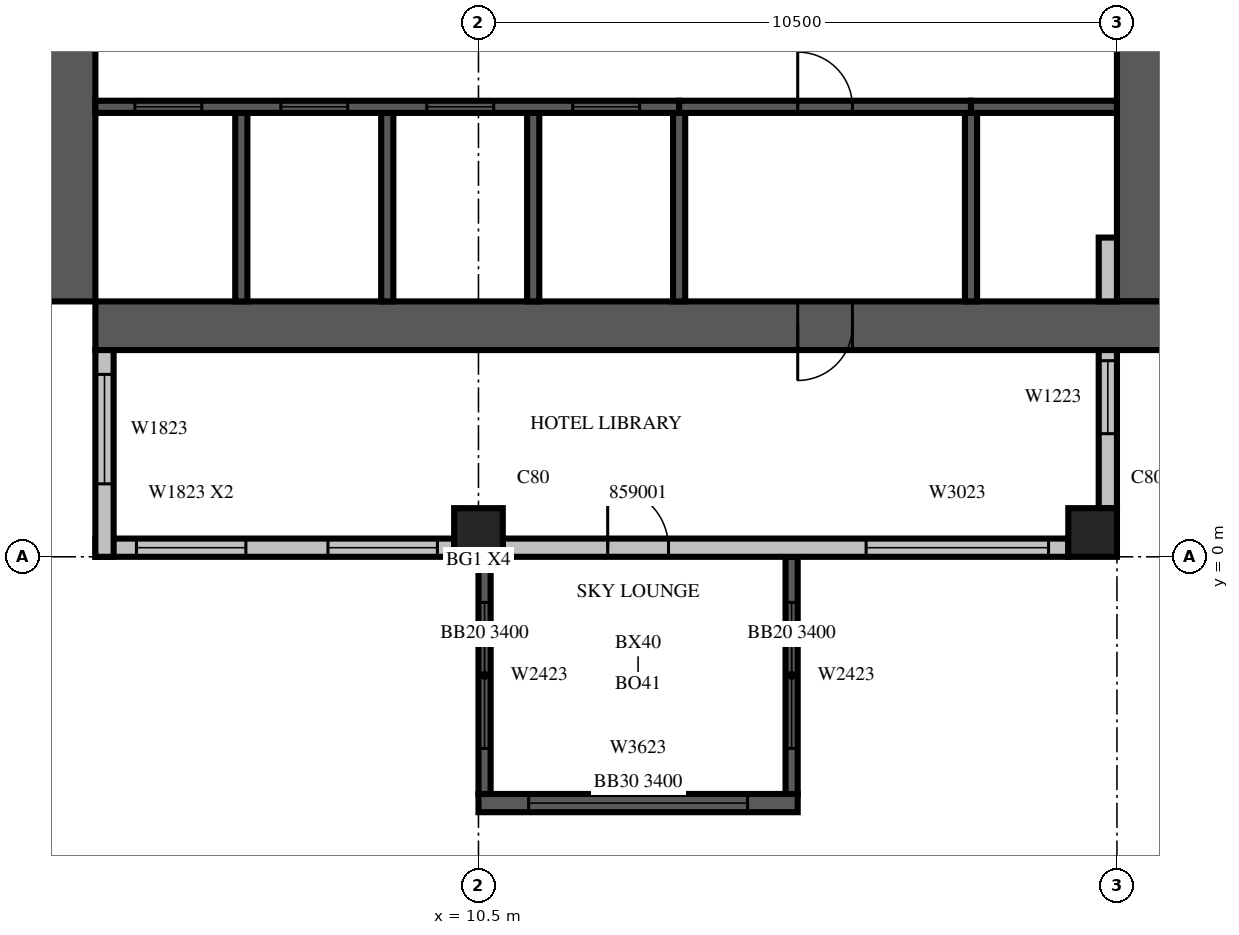
"""IFC4 building model, lengths in metres.
Left out: names, types, materials, properties, quantities, classifications, styles, units other than length and angle.
Written with IfcOpenShell. Run it as: python <this file> out.ifc"""

import sys

from ifc_helpers import new_model, si_unit, direction, frame, frame_2d, origin, origin_2d, place, context, subcontext, project, spatial, rectangle, extrude, source, transform, mapped, element, fill, save


model = new_model("IFC4")
c1 = context("Model", 3, precision=1e-05, world=origin(), true_north=direction((0.0, 1.0)))
c2 = subcontext(c1, "Body", "Model", "MODEL_VIEW")
j1 = project(units=[si_unit("LENGTHUNIT", "METRE"), si_unit("PLANEANGLEUNIT", "RADIAN")], contexts=[c1])
p1 = place(None, origin())
s1 = spatial("IfcSite", under=j1, at=p1, CompositionType="ELEMENT")
p2 = place(p1, origin())
s2 = spatial("IfcBuilding", under=s1, at=p2, CompositionType="ELEMENT")
p3 = place(p2, frame((0.0, 0.0, 257.6)))
s3 = spatial("IfcBuildingStorey", under=s2, at=p3, CompositionType="ELEMENT", Elevation=257.6)
m1 = source(origin(), c2, "Body", "SweptSolid", [
    extrude(rectangle(XDim=0.8, YDim=0.8, at=origin_2d()), origin(), (0.0, 0.0, 1.0), 3.8),
])
for number, where, z_axis, x_axis in (
    (1, (10.5, 0.4, 0.0), (0.0, 0.0, 1.0), (1.0, 0.0, 0.0)),
    (2, (20.6, 0.4, 0.0), (0.0, 0.0, 1.0), (1.0, 0.0, 0.0)),
):
    element("IfcColumn", number, at=place(p3, frame(where, z_axis=z_axis, x_axis=x_axis)), inside=s3, PredefinedType="COLUMN", context=c2, shape_type="MappedRepresentation", body=[
        mapped(m1, transform((0.0, 0.0, 0.0), scale=1.0)),
    ])
m2 = source(origin(), c2, "Body", "SweptSolid", [
    extrude(rectangle(XDim=17.6, YDim=0.8, at=frame_2d((8.8, 0.0))), origin(), (0.0, 0.0, 1.0), 3.8),
])
p4 = place(p3, frame((3.8, 4.2, 0.0), z_axis=(0.0, 0.0, 1.0), x_axis=(0.0, 1.0, 0.0)))
e3 = element("IfcWall", 3, at=p4, inside=s3, PredefinedType="SHEAR", context=c2, shape_type="MappedRepresentation", body=[
    mapped(m2, transform((0.0, 0.0, 0.0), scale=1.0)),
])
m3 = source(origin(), c2, "Body", "SweptSolid", [
    extrude(rectangle(XDim=2.2, YDim=2.1, at=frame_2d((1.1, 1.05))), frame((0.0, 0.41, 0.0), z_axis=(0.0, -1.0, 0.0), x_axis=(1.0, 0.0, 0.0)), (0.0, 0.0, 1.0), 0.82),
])
p5 = place(p4, frame((4.2, 0.0, 0.0)))
e4 = element("IfcOpeningElement", 4, at=p5, cuts=e3, PredefinedType="OPENING", context=c2, shape_type="MappedRepresentation", body=[
    mapped(m3, transform((0.0, 0.0, 0.0), scale=1.0)),
])
m4 = source(origin(), c2, "Body", "SweptSolid", [
    extrude(rectangle(XDim=0.9, YDim=2.1, at=frame_2d((0.45, 1.05))), frame((0.0, 0.41, 0.0), z_axis=(0.0, -1.0, 0.0), x_axis=(1.0, 0.0, 0.0)), (0.0, 0.0, 1.0), 0.82),
])
p6 = place(p4, frame((10.95, 0.0, 0.0)))
e5 = element("IfcOpeningElement", 5, at=p6, cuts=e3, PredefinedType="OPENING", context=c2, shape_type="MappedRepresentation", body=[
    mapped(m4, transform((0.0, 0.0, 0.0), scale=1.0)),
])
m5 = source(origin(), c2, "Body", "SweptSolid", [
    extrude(rectangle(XDim=16.8, YDim=0.8, at=frame_2d((8.4, 0.0))), origin(), (0.0, 0.0, 1.0), 3.8),
])
p7 = place(p3, frame((21.4, 4.2, 0.0), z_axis=(0.0, 0.0, 1.0), x_axis=(0.0, 1.0, 0.0)))
e6 = element("IfcWall", 6, at=p7, inside=s3, PredefinedType="SHEAR", context=c2, shape_type="MappedRepresentation", body=[
    mapped(m5, transform((0.0, 0.0, 0.0), scale=1.0)),
])
m6 = source(origin(), c2, "Body", "SweptSolid", [
    extrude(rectangle(XDim=1.2, YDim=2.1, at=frame_2d((0.6, 1.05))), frame((0.0, 0.41, 0.0), z_axis=(0.0, -1.0, 0.0), x_axis=(1.0, 0.0, 0.0)), (0.0, 0.0, 1.0), 0.82),
])
p8 = place(p7, frame((14.7, 0.0, 0.0)))
e7 = element("IfcOpeningElement", 7, at=p8, cuts=e6, PredefinedType="OPENING", context=c2, shape_type="MappedRepresentation", body=[
    mapped(m6, transform((0.0, 0.0, 0.0), scale=1.0)),
])
p9 = place(p3, frame((4.2, 3.8, 0.0), z_axis=(0.0, 0.0, 1.0), x_axis=(1.0, 0.0, 0.0)))
e8 = element("IfcWall", 8, at=p9, inside=s3, PredefinedType="SHEAR", context=c2, shape_type="MappedRepresentation", body=[
    mapped(m2, transform((0.0, 0.0, 0.0), scale=1.0)),
])
p10 = place(p9, frame((11.55, 0.0, 0.0)))
e9 = element("IfcOpeningElement", 9, at=p10, cuts=e8, PredefinedType="OPENING", context=c2, shape_type="MappedRepresentation", body=[
    mapped(m4, transform((0.0, 0.0, 0.0), scale=1.0)),
])
m7 = source(origin(), c2, "Body", "SweptSolid", [
    extrude(rectangle(XDim=5.25, YDim=0.3, at=frame_2d((2.625, 0.0))), origin(), (0.0, 0.0, 1.0), 3.4),
])
p11 = place(p3, frame((10.5, -4.05, 0.0), z_axis=(0.0, 0.0, 1.0), x_axis=(1.0, 0.0, 0.0)))
e10 = element("IfcWall", 10, at=p11, inside=s3, PredefinedType="SOLIDWALL", context=c2, shape_type="MappedRepresentation", body=[
    mapped(m7, transform((0.0, 0.0, 0.0), scale=1.0)),
])
m8 = source(origin(), c2, "Body", "SweptSolid", [
    extrude(rectangle(XDim=3.6, YDim=2.3, at=frame_2d((1.8, 1.15))), frame((0.0, 0.16, 0.0), z_axis=(0.0, -1.0, 0.0), x_axis=(1.0, 0.0, 0.0)), (0.0, 0.0, 1.0), 0.32),
])
p12 = place(p11, frame((0.825, 0.0, 0.6)))
e11 = element("IfcOpeningElement", 11, at=p12, cuts=e10, PredefinedType="OPENING", context=c2, shape_type="MappedRepresentation", body=[
    mapped(m8, transform((0.0, 0.0, 0.0), scale=1.0)),
])
m9 = source(origin(), c2, "Body", "SweptSolid", [
    extrude(rectangle(XDim=3.9, YDim=0.2, at=frame_2d((1.95, 0.0))), origin(), (0.0, 0.0, 1.0), 3.4),
])
p13 = place(p3, frame((10.6, 0.0, 0.0), z_axis=(0.0, 0.0, 1.0), x_axis=(0.0, -1.0, 0.0)))
e12 = element("IfcWall", 12, at=p13, inside=s3, PredefinedType="SOLIDWALL", context=c2, shape_type="MappedRepresentation", body=[
    mapped(m9, transform((0.0, 0.0, 0.0), scale=1.0)),
])
m10 = source(origin(), c2, "Body", "SweptSolid", [
    extrude(rectangle(XDim=2.4, YDim=2.3, at=frame_2d((1.2, 1.15))), frame((0.0, 0.11, 0.0), z_axis=(0.0, -1.0, 0.0), x_axis=(1.0, 0.0, 0.0)), (0.0, 0.0, 1.0), 0.22),
])
p14 = place(p13, frame((0.75, 0.0, 0.6)))
e13 = element("IfcOpeningElement", 13, at=p14, cuts=e12, PredefinedType="OPENING", context=c2, shape_type="MappedRepresentation", body=[
    mapped(m10, transform((0.0, 0.0, 0.0), scale=1.0)),
])
p15 = place(p3, frame((15.65, 0.0, 0.0), z_axis=(0.0, 0.0, 1.0), x_axis=(0.0, -1.0, 0.0)))
e14 = element("IfcWall", 14, at=p15, inside=s3, PredefinedType="SOLIDWALL", context=c2, shape_type="MappedRepresentation", body=[
    mapped(m9, transform((0.0, 0.0, 0.0), scale=1.0)),
])
p16 = place(p15, frame((0.75, 0.0, 0.6)))
e15 = element("IfcOpeningElement", 15, at=p16, cuts=e14, PredefinedType="OPENING", context=c2, shape_type="MappedRepresentation", body=[
    mapped(m10, transform((0.0, 0.0, 0.0), scale=1.0)),
])
m11 = source(origin(), c2, "Body", "SweptSolid", [
    extrude(rectangle(XDim=5.9, YDim=0.3, at=frame_2d((2.95, 0.0))), origin(), (0.0, 0.0, 1.0), 3.4),
])
p17 = place(p3, frame((4.2, 0.15, 0.0), z_axis=(0.0, 0.0, 1.0), x_axis=(1.0, 0.0, 0.0)))
e16 = element("IfcWall", 16, at=p17, inside=s3, PredefinedType="STANDARD", context=c2, shape_type="MappedRepresentation", body=[
    mapped(m11, transform((0.0, 0.0, 0.0), scale=1.0)),
])
m12 = source(origin(), c2, "Body", "SweptSolid", [
    extrude(rectangle(XDim=1.8, YDim=2.3, at=frame_2d((0.9, 1.15))), frame((0.0, 0.16, 0.0), z_axis=(0.0, -1.0, 0.0), x_axis=(1.0, 0.0, 0.0)), (0.0, 0.0, 1.0), 0.32),
])
p18 = place(p17, frame((0.675, 0.0, 0.6)))
e17 = element("IfcOpeningElement", 17, at=p18, cuts=e16, PredefinedType="OPENING", context=c2, shape_type="MappedRepresentation", body=[
    mapped(m12, transform((0.0, 0.0, 0.0), scale=1.0)),
])
p19 = place(p17, frame((3.825, 0.0, 0.6)))
e18 = element("IfcOpeningElement", 18, at=p19, cuts=e16, PredefinedType="OPENING", context=c2, shape_type="MappedRepresentation", body=[
    mapped(m12, transform((0.0, 0.0, 0.0), scale=1.0)),
])
m13 = source(origin(), c2, "Body", "SweptSolid", [
    extrude(rectangle(XDim=9.3, YDim=0.3, at=frame_2d((4.65, 0.0))), origin(), (0.0, 0.0, 1.0), 3.4),
])
p20 = place(p3, frame((10.9, 0.15, 0.0), z_axis=(0.0, 0.0, 1.0), x_axis=(1.0, 0.0, 0.0)))
e19 = element("IfcWall", 19, at=p20, inside=s3, PredefinedType="STANDARD", context=c2, shape_type="MappedRepresentation", body=[
    mapped(m13, transform((0.0, 0.0, 0.0), scale=1.0)),
])
m14 = source(origin(), c2, "Body", "SweptSolid", [
    extrude(rectangle(XDim=3.0, YDim=2.3, at=frame_2d((1.5, 1.15))), frame((0.0, 0.16, 0.0), z_axis=(0.0, -1.0, 0.0), x_axis=(1.0, 0.0, 0.0)), (0.0, 0.0, 1.0), 0.32),
])
p21 = place(p20, frame((5.975, 0.0, 0.6)))
e20 = element("IfcOpeningElement", 20, at=p21, cuts=e19, PredefinedType="OPENING", context=c2, shape_type="MappedRepresentation", body=[
    mapped(m14, transform((0.0, 0.0, 0.0), scale=1.0)),
])
m15 = source(origin(), c2, "Body", "SweptSolid", [
    extrude(rectangle(XDim=1.0, YDim=2.1, at=frame_2d((0.5, 1.05))), frame((0.0, 0.16, 0.0), z_axis=(0.0, -1.0, 0.0), x_axis=(1.0, 0.0, 0.0)), (0.0, 0.0, 1.0), 0.32),
])
p22 = place(p20, frame((1.725, 0.0, 0.0)))
e21 = element("IfcOpeningElement", 21, at=p22, cuts=e19, PredefinedType="OPENING", context=c2, shape_type="MappedRepresentation", body=[
    mapped(m15, transform((0.0, 0.0, 0.0), scale=1.0)),
])
m16 = source(origin(), c2, "Body", "SweptSolid", [
    extrude(rectangle(XDim=2.6, YDim=0.3, at=frame_2d((1.3, 0.0))), origin(), (0.0, 0.0, 1.0), 3.4),
])
p23 = place(p3, frame((20.85, 0.8, 0.0), z_axis=(0.0, 0.0, 1.0), x_axis=(0.0, 1.0, 0.0)))
e22 = element("IfcWall", 22, at=p23, inside=s3, PredefinedType="STANDARD", context=c2, shape_type="MappedRepresentation", body=[
    mapped(m16, transform((0.0, 0.0, 0.0), scale=1.0)),
])
m17 = source(origin(), c2, "Body", "SweptSolid", [
    extrude(rectangle(XDim=1.2, YDim=2.3, at=frame_2d((0.6, 1.15))), frame((0.0, 0.16, 0.0), z_axis=(0.0, -1.0, 0.0), x_axis=(1.0, 0.0, 0.0)), (0.0, 0.0, 1.0), 0.32),
])
p24 = place(p23, frame((1.225, 0.0, 0.6)))
e23 = element("IfcOpeningElement", 23, at=p24, cuts=e22, PredefinedType="OPENING", context=c2, shape_type="MappedRepresentation", body=[
    mapped(m17, transform((0.0, 0.0, 0.0), scale=1.0)),
])
m18 = source(origin(), c2, "Body", "SweptSolid", [
    extrude(rectangle(XDim=1.05, YDim=0.3, at=frame_2d((0.525, 0.0))), origin(), (0.0, 0.0, 1.0), 3.4),
])
p25 = place(p3, frame((20.85, 4.2, 0.0), z_axis=(0.0, 0.0, 1.0), x_axis=(0.0, 1.0, 0.0)))
e24 = element("IfcWall", 24, at=p25, inside=s3, PredefinedType="STANDARD", context=c2, shape_type="MappedRepresentation", body=[
    mapped(m18, transform((0.0, 0.0, 0.0), scale=1.0)),
])
m19 = source(origin(), c2, "Body", "SweptSolid", [
    extrude(rectangle(XDim=3.4, YDim=0.3, at=frame_2d((1.7, 0.0))), origin(), (0.0, 0.0, 1.0), 3.4),
])
p26 = place(p3, frame((4.35, 3.4, 0.0), z_axis=(0.0, 0.0, 1.0), x_axis=(0.0, -1.0, 0.0)))
e25 = element("IfcWall", 25, at=p26, inside=s3, PredefinedType="STANDARD", context=c2, shape_type="MappedRepresentation", body=[
    mapped(m19, transform((0.0, 0.0, 0.0), scale=1.0)),
])
p27 = place(p26, frame((0.4, 0.0, 0.6)))
e26 = element("IfcOpeningElement", 26, at=p27, cuts=e25, PredefinedType="OPENING", context=c2, shape_type="MappedRepresentation", body=[
    mapped(m12, transform((0.0, 0.0, 0.0), scale=1.0)),
])
m20 = source(origin(), c2, "Body", "SweptSolid", [
    extrude(rectangle(XDim=3.1, YDim=0.2, at=frame_2d((1.55, 0.0))), origin(), (0.0, 0.0, 1.0), 3.8),
])
for number, where, z_axis, x_axis in (
    (27, (6.6, 4.2, 0.0), (0.0, 0.0, 1.0), (0.0, 1.0, 0.0)),
    (28, (9.0, 4.2, 0.0), (0.0, 0.0, 1.0), (0.0, 1.0, 0.0)),
    (29, (11.4, 4.2, 0.0), (0.0, 0.0, 1.0), (0.0, 1.0, 0.0)),
):
    element("IfcWall", number, at=place(p3, frame(where, z_axis=z_axis, x_axis=x_axis)), inside=s3, PredefinedType="SOLIDWALL", context=c2, shape_type="MappedRepresentation", body=[
        mapped(m20, transform((0.0, 0.0, 0.0), scale=1.0)),
    ])
m21 = source(origin(), c2, "Body", "SweptSolid", [
    extrude(rectangle(XDim=3.1, YDim=0.2, at=frame_2d((1.55, 0.0))), origin(), (0.0, 0.0, 1.0), 3.4),
])
for number, where, z_axis, x_axis in (
    (30, (13.8, 4.2, 0.0), (0.0, 0.0, 1.0), (0.0, 1.0, 0.0)),
    (31, (18.6, 4.2, 0.0), (0.0, 0.0, 1.0), (0.0, 1.0, 0.0)),
):
    element("IfcWall", number, at=place(p3, frame(where, z_axis=z_axis, x_axis=x_axis)), inside=s3, PredefinedType="SOLIDWALL", context=c2, shape_type="MappedRepresentation", body=[
        mapped(m21, transform((0.0, 0.0, 0.0), scale=1.0)),
    ])
m22 = source(origin(), c2, "Body", "SweptSolid", [
    extrude(rectangle(XDim=9.6, YDim=0.2, at=frame_2d((4.8, 0.0))), origin(), (0.0, 0.0, 1.0), 3.8),
])
p28 = place(p3, frame((4.2, 7.4, 0.0), z_axis=(0.0, 0.0, 1.0), x_axis=(1.0, 0.0, 0.0)))
e32 = element("IfcWall", 32, at=p28, inside=s3, PredefinedType="SOLIDWALL", context=c2, shape_type="MappedRepresentation", body=[
    mapped(m22, transform((0.0, 0.0, 0.0), scale=1.0)),
])
m23 = source(origin(), c2, "Body", "SweptSolid", [
    extrude(rectangle(XDim=1.1, YDim=2.1, at=frame_2d((0.55, 1.05))), frame((0.0, 0.11, 0.0), z_axis=(0.0, -1.0, 0.0), x_axis=(1.0, 0.0, 0.0)), (0.0, 0.0, 1.0), 0.22),
])
p29 = place(p28, frame((0.65, 0.0, 0.0)))
e33 = element("IfcOpeningElement", 33, at=p29, cuts=e32, PredefinedType="OPENING", context=c2, shape_type="MappedRepresentation", body=[
    mapped(m23, transform((0.0, 0.0, 0.0), scale=1.0)),
])
p30 = place(p28, frame((3.05, 0.0, 0.0)))
e34 = element("IfcOpeningElement", 34, at=p30, cuts=e32, PredefinedType="OPENING", context=c2, shape_type="MappedRepresentation", body=[
    mapped(m23, transform((0.0, 0.0, 0.0), scale=1.0)),
])
p31 = place(p28, frame((5.45, 0.0, 0.0)))
e35 = element("IfcOpeningElement", 35, at=p31, cuts=e32, PredefinedType="OPENING", context=c2, shape_type="MappedRepresentation", body=[
    mapped(m23, transform((0.0, 0.0, 0.0), scale=1.0)),
])
p32 = place(p28, frame((7.85, 0.0, 0.0)))
e36 = element("IfcOpeningElement", 36, at=p32, cuts=e32, PredefinedType="OPENING", context=c2, shape_type="MappedRepresentation", body=[
    mapped(m23, transform((0.0, 0.0, 0.0), scale=1.0)),
])
m24 = source(origin(), c2, "Body", "SweptSolid", [
    extrude(rectangle(XDim=4.8, YDim=0.2, at=frame_2d((2.4, 0.0))), origin(), (0.0, 0.0, 1.0), 3.4),
])
p33 = place(p3, frame((13.8, 7.4, 0.0), z_axis=(0.0, 0.0, 1.0), x_axis=(1.0, 0.0, 0.0)))
e37 = element("IfcWall", 37, at=p33, inside=s3, PredefinedType="SOLIDWALL", context=c2, shape_type="MappedRepresentation", body=[
    mapped(m24, transform((0.0, 0.0, 0.0), scale=1.0)),
])
m25 = source(origin(), c2, "Body", "SweptSolid", [
    extrude(rectangle(XDim=0.9, YDim=2.1, at=frame_2d((0.45, 1.05))), frame((0.0, 0.11, 0.0), z_axis=(0.0, -1.0, 0.0), x_axis=(1.0, 0.0, 0.0)), (0.0, 0.0, 1.0), 0.22),
])
p34 = place(p33, frame((1.95, 0.0, 0.0)))
e38 = element("IfcOpeningElement", 38, at=p34, cuts=e37, PredefinedType="OPENING", context=c2, shape_type="MappedRepresentation", body=[
    mapped(m25, transform((0.0, 0.0, 0.0), scale=1.0)),
])
m26 = source(origin(), c2, "Body", "SweptSolid", [
    extrude(rectangle(XDim=2.4, YDim=0.2, at=frame_2d((1.2, 0.0))), origin(), (0.0, 0.0, 1.0), 3.8),
])
p35 = place(p3, frame((18.6, 7.4, 0.0), z_axis=(0.0, 0.0, 1.0), x_axis=(1.0, 0.0, 0.0)))
e39 = element("IfcWall", 39, at=p35, inside=s3, PredefinedType="SOLIDWALL", context=c2, shape_type="MappedRepresentation", body=[
    mapped(m26, transform((0.0, 0.0, 0.0), scale=1.0)),
])
m27 = source(origin(), c2, "Body", "SweptSolid", [
    extrude(rectangle(XDim=3.6, YDim=2.3, at=frame_2d((1.8, 1.15))), frame((0.0, 0.03, 0.0), z_axis=(0.0, -1.0, 0.0), x_axis=(1.0, 0.0, 0.0)), (0.0, 0.0, 1.0), 0.06),
])
p36 = place(p12, origin())
e40 = element("IfcWindow", 40, at=p36, inside=s3, PartitioningType="SINGLE_PANEL", PredefinedType="WINDOW", context=c2, shape_type="MappedRepresentation", body=[
    mapped(m27, transform((0.0, 0.0, 0.0), scale=1.0)),
])
fill(e11, e40)
m28 = source(origin(), c2, "Body", "SweptSolid", [
    extrude(rectangle(XDim=2.4, YDim=2.3, at=frame_2d((1.2, 1.15))), frame((0.0, 0.03, 0.0), z_axis=(0.0, -1.0, 0.0), x_axis=(1.0, 0.0, 0.0)), (0.0, 0.0, 1.0), 0.06),
])
p37 = place(p14, origin())
e41 = element("IfcWindow", 41, at=p37, inside=s3, PartitioningType="SINGLE_PANEL", PredefinedType="WINDOW", context=c2, shape_type="MappedRepresentation", body=[
    mapped(m28, transform((0.0, 0.0, 0.0), scale=1.0)),
])
fill(e13, e41)
p38 = place(p16, origin())
e42 = element("IfcWindow", 42, at=p38, inside=s3, PartitioningType="SINGLE_PANEL", PredefinedType="WINDOW", context=c2, shape_type="MappedRepresentation", body=[
    mapped(m28, transform((0.0, 0.0, 0.0), scale=1.0)),
])
fill(e15, e42)
m29 = source(origin(), c2, "Body", "SweptSolid", [
    extrude(rectangle(XDim=1.8, YDim=2.3, at=frame_2d((0.9, 1.15))), frame((0.0, 0.03, 0.0), z_axis=(0.0, -1.0, 0.0), x_axis=(1.0, 0.0, 0.0)), (0.0, 0.0, 1.0), 0.06),
])
p39 = place(p18, origin())
e43 = element("IfcWindow", 43, at=p39, inside=s3, PartitioningType="SINGLE_PANEL", PredefinedType="WINDOW", context=c2, shape_type="MappedRepresentation", body=[
    mapped(m29, transform((0.0, 0.0, 0.0), scale=1.0)),
])
fill(e17, e43)
p40 = place(p19, origin())
e44 = element("IfcWindow", 44, at=p40, inside=s3, PartitioningType="SINGLE_PANEL", PredefinedType="WINDOW", context=c2, shape_type="MappedRepresentation", body=[
    mapped(m29, transform((0.0, 0.0, 0.0), scale=1.0)),
])
fill(e18, e44)
m30 = source(origin(), c2, "Body", "SweptSolid", [
    extrude(rectangle(XDim=3.0, YDim=2.3, at=frame_2d((1.5, 1.15))), frame((0.0, 0.03, 0.0), z_axis=(0.0, -1.0, 0.0), x_axis=(1.0, 0.0, 0.0)), (0.0, 0.0, 1.0), 0.06),
])
p41 = place(p21, origin())
e45 = element("IfcWindow", 45, at=p41, inside=s3, PartitioningType="SINGLE_PANEL", PredefinedType="WINDOW", context=c2, shape_type="MappedRepresentation", body=[
    mapped(m30, transform((0.0, 0.0, 0.0), scale=1.0)),
])
fill(e20, e45)
m31 = source(origin(), c2, "Body", "SweptSolid", [
    extrude(rectangle(XDim=1.2, YDim=2.3, at=frame_2d((0.6, 1.15))), frame((0.0, 0.03, 0.0), z_axis=(0.0, -1.0, 0.0), x_axis=(1.0, 0.0, 0.0)), (0.0, 0.0, 1.0), 0.06),
])
p42 = place(p24, origin())
e46 = element("IfcWindow", 46, at=p42, inside=s3, PartitioningType="SINGLE_PANEL", PredefinedType="WINDOW", context=c2, shape_type="MappedRepresentation", body=[
    mapped(m31, transform((0.0, 0.0, 0.0), scale=1.0)),
])
fill(e23, e46)
p43 = place(p27, origin())
e47 = element("IfcWindow", 47, at=p43, inside=s3, PartitioningType="SINGLE_PANEL", PredefinedType="WINDOW", context=c2, shape_type="MappedRepresentation", body=[
    mapped(m29, transform((0.0, 0.0, 0.0), scale=1.0)),
])
fill(e26, e47)
m32 = source(origin(), c2, "Body", "SweptSolid", [
    extrude(rectangle(XDim=1.1, YDim=2.1, at=frame_2d((0.55, 1.05))), frame((0.0, 0.025, 0.0), z_axis=(0.0, -1.0, 0.0), x_axis=(1.0, 0.0, 0.0)), (0.0, 0.0, 1.0), 0.05),
])
p44 = place(p29, origin())
e48 = element("IfcDoor", 48, at=p44, inside=s3, OperationType="SLIDING_TO_LEFT", PredefinedType="DOOR", context=c2, shape_type="MappedRepresentation", body=[
    mapped(m32, transform((0.0, 0.0, 0.0), scale=1.0)),
])
fill(e33, e48)
p45 = place(p30, origin())
e49 = element("IfcDoor", 49, at=p45, inside=s3, OperationType="SLIDING_TO_LEFT", PredefinedType="DOOR", context=c2, shape_type="MappedRepresentation", body=[
    mapped(m32, transform((0.0, 0.0, 0.0), scale=1.0)),
])
fill(e34, e49)
p46 = place(p31, origin())
e50 = element("IfcDoor", 50, at=p46, inside=s3, OperationType="SLIDING_TO_LEFT", PredefinedType="DOOR", context=c2, shape_type="MappedRepresentation", body=[
    mapped(m32, transform((0.0, 0.0, 0.0), scale=1.0)),
])
fill(e35, e50)
p47 = place(p32, origin())
e51 = element("IfcDoor", 51, at=p47, inside=s3, OperationType="SLIDING_TO_LEFT", PredefinedType="DOOR", context=c2, shape_type="MappedRepresentation", body=[
    mapped(m32, transform((0.0, 0.0, 0.0), scale=1.0)),
])
fill(e36, e51)
m33 = source(origin(), c2, "Body", "SweptSolid", [
    extrude(rectangle(XDim=0.9, YDim=2.1, at=frame_2d((0.45, 1.05))), frame((0.0, 0.025, 0.0), z_axis=(0.0, -1.0, 0.0), x_axis=(1.0, 0.0, 0.0)), (0.0, 0.0, 1.0), 0.05),
])
p48 = place(p34, origin())
e52 = element("IfcDoor", 52, at=p48, inside=s3, OperationType="SINGLE_SWING_LEFT", PredefinedType="DOOR", context=c2, shape_type="MappedRepresentation", body=[
    mapped(m33, transform((0.0, 0.0, 0.0), scale=1.0)),
])
fill(e38, e52)
p49 = place(p10, origin())
e53 = element("IfcDoor", 53, at=p49, inside=s3, OperationType="SINGLE_SWING_RIGHT", PredefinedType="DOOR", context=c2, shape_type="MappedRepresentation", body=[
    mapped(m33, transform((0.0, 0.0, 0.0), scale=1.0)),
])
fill(e9, e53)
m34 = source(origin(), c2, "Body", "SweptSolid", [
    extrude(rectangle(XDim=1.0, YDim=2.1, at=frame_2d((0.5, 1.05))), frame((0.0, 0.025, 0.0), z_axis=(0.0, -1.0, 0.0), x_axis=(1.0, 0.0, 0.0)), (0.0, 0.0, 1.0), 0.05),
])
p50 = place(p22, origin())
e54 = element("IfcDoor", 54, at=p50, inside=s3, OperationType="SINGLE_SWING_LEFT", PredefinedType="DOOR", context=c2, shape_type="MappedRepresentation", body=[
    mapped(m34, transform((0.0, 0.0, 0.0), scale=1.0)),
])
fill(e21, e54)
save(model, sys.argv[1])
